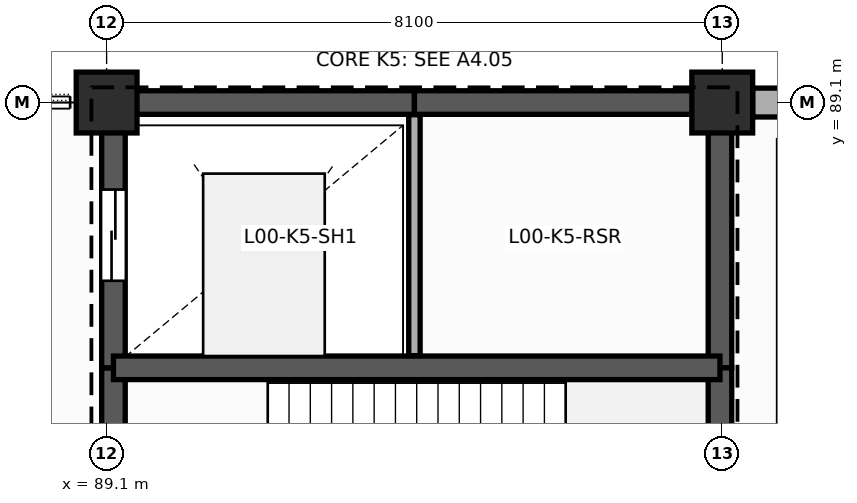
"""IFC4 building model, lengths in metres.
Left out: names, types, materials, properties, quantities, classifications, styles, units other than length and angle.
Written with IfcOpenShell. Run it as: python <this file> out.ifc"""

import sys

from ifc_helpers import new_model, si_unit, direction, frame, frame_2d, origin, origin_2d, place, context, subcontext, project, spatial, rectangle, extrude, element, fill, save


model = new_model("IFC4")
c1 = context("Model", 3, precision=1e-05, world=origin(), true_north=direction((0.0, 1.0)))
c2 = subcontext(c1, "Body", "Model", "MODEL_VIEW")
j1 = project(units=[si_unit("LENGTHUNIT", "METRE"), si_unit("PLANEANGLEUNIT", "RADIAN")], contexts=[c1])
p1 = place(None, origin())
s1 = spatial("IfcSite", under=j1, at=p1, CompositionType="ELEMENT")
p2 = place(p1, origin())
s2 = spatial("IfcBuilding", under=s1, at=p2, CompositionType="ELEMENT")
p3 = place(p2, origin())
s3 = spatial("IfcBuildingStorey", under=s2, at=p3, CompositionType="ELEMENT", Elevation=0.0)
for number, where, z_axis, x_axis in (
    (1, (89.1, 89.1, 0.0), (0.0, 0.0, 1.0), (1.0, 0.0, 0.0)),
    (2, (97.2, 89.1, 0.0), (0.0, 0.0, 1.0), (1.0, 0.0, 0.0)),
):
    element("IfcColumn", number, at=place(p3, frame(where, z_axis=z_axis, x_axis=x_axis)), inside=s3, PredefinedType="COLUMN", context=c2, shape_type="SweptSolid", body=[
        extrude(rectangle(XDim=0.8, YDim=0.8, at=origin_2d()), origin(), (0.0, 0.0, 1.0), 5.4),
    ])
p4 = place(p3, frame((97.6, 89.1, 0.0), z_axis=(0.0, 0.0, 1.0), x_axis=(1.0, 0.0, 0.0)))
e3 = element("IfcWall", 3, at=p4, inside=s3, PredefinedType="SOLIDWALL", context=c2, shape_type="SweptSolid", body=[
    extrude(rectangle(XDim=7.3, YDim=0.38, at=frame_2d((3.65, 0.0))), origin(), (0.0, 0.0, 1.0), 4.727),
])
p5 = place(p3, frame((89.19, 81.25, 0.0), z_axis=(0.0, 0.0, 1.0), x_axis=(0.0, 1.0, 0.0)))
e4 = element("IfcWall", 4, at=p5, inside=s3, PredefinedType="SHEAR", context=c2, shape_type="SweptSolid", body=[
    extrude(rectangle(XDim=4.36, YDim=0.31, at=frame_2d((2.18, 0.0))), origin(), (0.0, 0.0, 1.0), 5.4),
])
p6 = place(p5, frame((1.35, 0.0, 0.0)))
e5 = element("IfcOpeningElement", 5, at=p6, cuts=e4, PredefinedType="OPENING", context=c2, shape_type="SweptSolid", body=[
    extrude(rectangle(XDim=1.2, YDim=2.25, at=frame_2d((0.6, 1.125))), frame((0.0, 0.165, 0.0), z_axis=(0.0, -1.0, 0.0), x_axis=(1.0, 0.0, 0.0)), (0.0, 0.0, 1.0), 0.33),
])
p7 = place(p3, frame((89.19, 85.61, 0.0), z_axis=(0.0, 0.0, 1.0), x_axis=(0.0, 1.0, 0.0)))
e6 = element("IfcWall", 6, at=p7, inside=s3, PredefinedType="SHEAR", context=c2, shape_type="SweptSolid", body=[
    extrude(rectangle(XDim=3.49, YDim=0.31, at=frame_2d((1.745, 0.0))), origin(), (0.0, 0.0, 1.0), 5.4),
])
p8 = place(p7, frame((1.145, 0.0, 0.0)))
e7 = element("IfcOpeningElement", 7, at=p8, cuts=e6, PredefinedType="OPENING", context=c2, shape_type="SweptSolid", body=[
    extrude(rectangle(XDim=1.2, YDim=2.2, at=frame_2d((0.6, 1.1))), frame((0.0, 0.165, 0.0), z_axis=(0.0, -1.0, 0.0), x_axis=(1.0, 0.0, 0.0)), (0.0, 0.0, 1.0), 0.33),
])
p9 = place(p3, frame((89.19, 89.1, 0.0), z_axis=(0.0, 0.0, 1.0), x_axis=(1.0, 0.0, 0.0)))
e8 = element("IfcWall", 8, at=p9, inside=s3, PredefinedType="SHEAR", context=c2, shape_type="SweptSolid", body=[
    extrude(rectangle(XDim=3.96, YDim=0.31, at=frame_2d((1.98, 0.0))), origin(), (0.0, 0.0, 1.0), 5.4),
])
p10 = place(p3, frame((93.15, 89.1, 0.0), z_axis=(0.0, 0.0, 1.0), x_axis=(1.0, 0.0, 0.0)))
e9 = element("IfcWall", 9, at=p10, inside=s3, PredefinedType="SHEAR", context=c2, shape_type="SweptSolid", body=[
    extrude(rectangle(XDim=4.02, YDim=0.31, at=frame_2d((2.01, 0.0))), origin(), (0.0, 0.0, 1.0), 5.4),
])
p11 = place(p3, frame((97.17, 89.1, 0.0), z_axis=(0.0, 0.0, 1.0), x_axis=(0.0, -1.0, 0.0)))
e10 = element("IfcWall", 10, at=p11, inside=s3, PredefinedType="SHEAR", context=c2, shape_type="SweptSolid", body=[
    extrude(rectangle(XDim=3.49, YDim=0.31, at=frame_2d((1.745, 0.0))), origin(), (0.0, 0.0, 1.0), 5.4),
])
p12 = place(p3, frame((97.17, 85.61, 0.0), z_axis=(0.0, 0.0, 1.0), x_axis=(0.0, -1.0, 0.0)))
e11 = element("IfcWall", 11, at=p12, inside=s3, PredefinedType="SHEAR", context=c2, shape_type="SweptSolid", body=[
    extrude(rectangle(XDim=4.36, YDim=0.31, at=frame_2d((2.18, 0.0))), origin(), (0.0, 0.0, 1.0), 5.4),
])
p13 = place(p3, frame((89.19, 85.61, 0.0), z_axis=(0.0, 0.0, 1.0), x_axis=(1.0, 0.0, 0.0)))
e12 = element("IfcWall", 12, at=p13, inside=s3, PredefinedType="SHEAR", context=c2, shape_type="SweptSolid", body=[
    extrude(rectangle(XDim=7.98, YDim=0.31, at=frame_2d((3.99, 0.0))), origin(), (0.0, 0.0, 1.0), 5.4),
])
p14 = place(p3, frame((93.15, 85.77, 0.0), z_axis=(0.0, 0.0, 1.0), x_axis=(0.0, 1.0, 0.0)))
e13 = element("IfcWall", 13, at=p14, inside=s3, PredefinedType="PLUMBINGWALL", context=c2, shape_type="SweptSolid", body=[
    extrude(rectangle(XDim=3.17, YDim=0.15, at=frame_2d((1.585, 0.0))), origin(), (0.0, 0.0, 1.0), 5.05),
])
p15 = place(p8, origin())
e14 = element("IfcDoor", 14, at=p15, inside=s3, OperationType="SLIDING_TO_LEFT", PredefinedType="DOOR", context=c2, shape_type="SweptSolid", body=[
    extrude(rectangle(XDim=1.2, YDim=2.2, at=frame_2d((0.6, 1.1))), frame((0.0, 0.025, 0.0), z_axis=(0.0, -1.0, 0.0), x_axis=(1.0, 0.0, 0.0)), (0.0, 0.0, 1.0), 0.05),
])
fill(e7, e14)
save(model, sys.argv[1])
